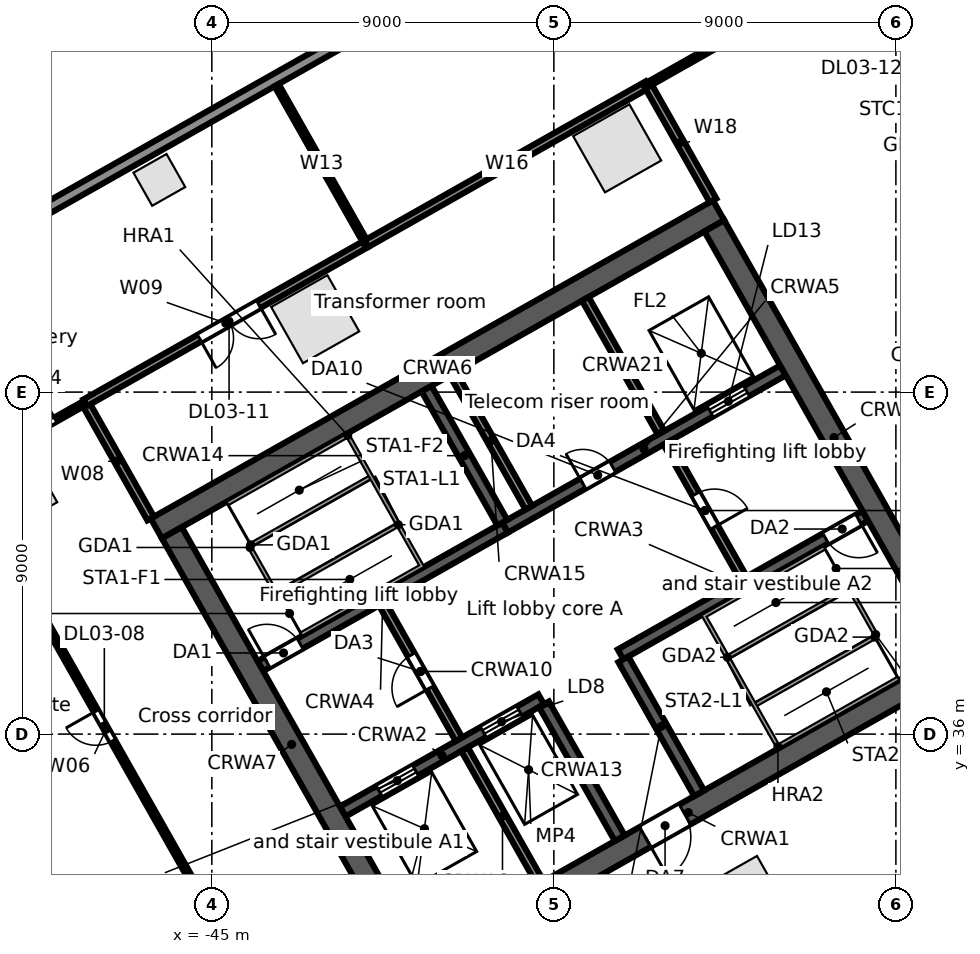
"""IFC4 building model, lengths in metres.
Left out: names, types, materials, properties, quantities, classifications, styles, units other than length and angle.
Written with IfcOpenShell. Run it as: python <this file> out.ifc"""

import sys

from ifc_helpers import new_model, si_unit, direction, frame, frame_2d, origin, origin_2d, place, context, subcontext, project, spatial, rectangle, extrude, element, fill, save


model = new_model("IFC4")
c1 = context("Model", 3, precision=1e-05, world=origin(), true_north=direction((0.0, 1.0)))
c2 = subcontext(c1, "Body", "Model", "MODEL_VIEW")
j1 = project(units=[si_unit("LENGTHUNIT", "METRE"), si_unit("PLANEANGLEUNIT", "RADIAN")], contexts=[c1])
p1 = place(None, origin())
s1 = spatial("IfcSite", under=j1, at=p1, CompositionType="ELEMENT")
p2 = place(p1, origin())
s2 = spatial("IfcBuilding", under=s1, at=p2, CompositionType="ELEMENT")
p3 = place(p2, frame((0.0, 0.0, 16.5)))
s3 = spatial("IfcBuildingStorey", under=s2, at=p3, CompositionType="ELEMENT", Elevation=16.5)
for number, where, z_axis, x_axis in (
    (1, (-34.334, 51.414, 0.0), (0.0, 0.0, 1.0), (-0.87, -0.492, 0.0)),
    (2, (-42.28, 46.919, 0.0), (0.0, 0.0, 1.0), (-0.87, -0.492, 0.0)),
    (3, (-50.226, 42.423, 0.0), (0.0, 0.0, 1.0), (-0.87, -0.492, 0.0)),
    (4, (-30.976, 31.635, 0.0), (0.0, 0.0, 1.0), (0.87, 0.492, 0.0)),
):
    element("IfcColumn", number, at=place(p3, frame(where, z_axis=z_axis, x_axis=x_axis)), inside=s3, PredefinedType="COLUMN", context=c2, shape_type="SweptSolid", body=[
        extrude(rectangle(XDim=1.7, YDim=1.7, at=origin_2d()), origin(), (0.0, 0.0, 1.0), 5.0),
    ])
p4 = place(p3, frame((-46.381, 50.584, 0.0), z_axis=(0.0, 0.0, 1.0), x_axis=(-0.87035569594, -0.492423560103, 0.0)))
e5 = element("IfcColumn", 5, at=p4, inside=s3, PredefinedType="COLUMN", context=c2, shape_type="SweptSolid", body=[
    extrude(rectangle(XDim=1.0, YDim=1.0, at=origin_2d()), origin(), (0.0, 0.0, 1.0), 5.0),
])
p5 = place(p3, frame((-63.707, 41.701, 0.0), z_axis=(0.0, 0.0, 1.0), x_axis=(0.870355510268, 0.492423888277, 0.0)))
e6 = element("IfcWall", 6, at=p5, inside=s3, PredefinedType="STANDARD", context=c2, shape_type="SweptSolid", body=[
    extrude(rectangle(XDim=67.903, YDim=0.3, at=frame_2d((33.952, 0.0))), origin(), (0.0, 0.0, 1.0), 4.65),
])
p6 = place(p3, frame((-45.526, 21.522, 0.0), z_axis=(0.0, 0.0, 1.0), x_axis=(-0.857164837164, 0.515042174903, 0.0)))
e7 = element("IfcWall", 7, at=p6, inside=s3, PredefinedType="STANDARD", context=c2, shape_type="SweptSolid", body=[
    extrude(rectangle(XDim=21.35, YDim=0.3, at=frame_2d((10.675, 0.0))), origin(), (0.0, 0.0, 1.0), 4.65),
])
p7 = place(p3, frame((-39.862, 29.749, 0.0), z_axis=(0.0, 0.0, 1.0), x_axis=(0.870350116061, 0.492433422375, 0.0)))
e8 = element("IfcWall", 8, at=p7, inside=s3, PredefinedType="SOLIDWALL", context=c2, shape_type="SweptSolid", body=[
    extrude(rectangle(XDim=17.0, YDim=0.6, at=frame_2d((8.5, 0.0))), origin(), (0.0, 0.0, 1.0), 4.65),
])
p8 = place(p7, frame((7.2, 0.0, 0.0)))
e9 = element("IfcOpeningElement", 9, at=p8, cuts=e8, PredefinedType="OPENING", context=c2, shape_type="SweptSolid", body=[
    extrude(rectangle(XDim=1.2, YDim=2.1, at=frame_2d((0.6, 1.05))), frame((0.0, 0.31, 0.0), z_axis=(0.0, -1.0, 0.0), x_axis=(1.0, 0.0, 0.0)), (0.0, 0.0, 1.0), 0.62),
])
p9 = place(p3, frame((-41.556, 33.961, 0.0), z_axis=(0.0, 0.0, 1.0), x_axis=(0.870343731308, 0.492444706919, 0.0)))
e10 = element("IfcWall", 10, at=p9, inside=s3, PredefinedType="SOLIDWALL", context=c2, shape_type="SweptSolid", body=[
    extrude(rectangle(XDim=6.0, YDim=0.3, at=frame_2d((3.0, 0.0))), origin(), (0.0, 0.0, 1.0), 4.65),
])
p10 = place(p9, frame((1.1, 0.0, 0.0)))
e11 = element("IfcOpeningElement", 11, at=p10, cuts=e10, PredefinedType="OPENING", context=c2, shape_type="SweptSolid", body=[
    extrude(rectangle(XDim=1.1, YDim=2.1, at=frame_2d((0.55, 1.05))), frame((0.0, 0.16, 0.0), z_axis=(0.0, -1.0, 0.0), x_axis=(1.0, 0.0, 0.0)), (0.0, 0.0, 1.0), 0.32),
])
p11 = place(p9, frame((4.25, 0.0, 0.0)))
e12 = element("IfcOpeningElement", 12, at=p11, cuts=e10, PredefinedType="OPENING", context=c2, shape_type="SweptSolid", body=[
    extrude(rectangle(XDim=1.1, YDim=2.1, at=frame_2d((0.55, 1.05))), frame((0.0, 0.16, 0.0), z_axis=(0.0, -1.0, 0.0), x_axis=(1.0, 0.0, 0.0)), (0.0, 0.0, 1.0), 0.32),
])
p12 = place(p3, frame((-34.245, 38.097, 0.0), z_axis=(0.0, 0.0, 1.0), x_axis=(0.870364910201, 0.492407273597, 0.0)))
e13 = element("IfcWall", 13, at=p12, inside=s3, PredefinedType="SOLIDWALL", context=c2, shape_type="SweptSolid", body=[
    extrude(rectangle(XDim=7.4, YDim=0.3, at=frame_2d((3.7, 0.0))), origin(), (0.0, 0.0, 1.0), 4.65),
])
p13 = place(p12, frame((6.2, 0.0, 0.0)))
e14 = element("IfcOpeningElement", 14, at=p13, cuts=e13, PredefinedType="OPENING", context=c2, shape_type="SweptSolid", body=[
    extrude(rectangle(XDim=1.0, YDim=2.1, at=frame_2d((0.5, 1.05))), frame((0.0, 0.16, 0.0), z_axis=(0.0, -1.0, 0.0), x_axis=(1.0, 0.0, 0.0)), (0.0, 0.0, 1.0), 0.32),
])
p14 = place(p3, frame((-43.723, 37.791, 0.0), z_axis=(0.0, 0.0, 1.0), x_axis=(0.87035077051, 0.49243226567, 0.0)))
e15 = element("IfcWall", 15, at=p14, inside=s3, PredefinedType="SOLIDWALL", context=c2, shape_type="SweptSolid", body=[
    extrude(rectangle(XDim=7.4, YDim=0.3, at=frame_2d((3.7, 0.0))), origin(), (0.0, 0.0, 1.0), 4.65),
])
p15 = place(p14, frame((0.2, 0.0, 0.0)))
e16 = element("IfcOpeningElement", 16, at=p15, cuts=e15, PredefinedType="OPENING", context=c2, shape_type="SweptSolid", body=[
    extrude(rectangle(XDim=1.0, YDim=2.1, at=frame_2d((0.5, 1.05))), frame((0.0, 0.16, 0.0), z_axis=(0.0, -1.0, 0.0), x_axis=(1.0, 0.0, 0.0)), (0.0, 0.0, 1.0), 0.32),
])
p16 = place(p3, frame((-37.282, 41.435, 0.0), z_axis=(0.0, 0.0, 1.0), x_axis=(0.870356516133, 0.492422110414, 0.0)))
e17 = element("IfcWall", 17, at=p16, inside=s3, PredefinedType="SOLIDWALL", context=c2, shape_type="SweptSolid", body=[
    extrude(rectangle(XDim=8.4, YDim=0.3, at=frame_2d((4.2, 0.0))), origin(), (0.0, 0.0, 1.0), 4.65),
])
p17 = place(p16, frame((6.2, 0.0, 0.0)))
e18 = element("IfcOpeningElement", 18, at=p17, cuts=e17, PredefinedType="OPENING", context=c2, shape_type="SweptSolid", body=[
    extrude(rectangle(XDim=1.1, YDim=2.1, at=frame_2d((0.55, 1.05))), frame((0.0, 0.16, 0.0), z_axis=(0.0, -1.0, 0.0), x_axis=(1.0, 0.0, 0.0)), (0.0, 0.0, 1.0), 0.32),
])
p18 = place(p16, frame((2.35, 0.0, 0.0)))
e19 = element("IfcOpeningElement", 19, at=p18, cuts=e17, PredefinedType="OPENING", context=c2, shape_type="SweptSolid", body=[
    extrude(rectangle(XDim=0.9, YDim=2.1, at=frame_2d((0.45, 1.05))), frame((0.0, 0.16, 0.0), z_axis=(0.0, -1.0, 0.0), x_axis=(1.0, 0.0, 0.0)), (0.0, 0.0, 1.0), 0.32),
])
p19 = place(p3, frame((-46.461, 41.412, 0.0), z_axis=(0.0, 0.0, 1.0), x_axis=(0.870350116061, 0.492433422375, 0.0)))
e20 = element("IfcWall", 20, at=p19, inside=s3, PredefinedType="SOLIDWALL", context=c2, shape_type="SweptSolid", body=[
    extrude(rectangle(XDim=17.0, YDim=0.6, at=frame_2d((8.5, 0.0))), origin(), (0.0, 0.0, 1.0), 4.65),
])
p20 = place(p3, frame((-46.052, 41.298, 0.0), z_axis=(0.0, 0.0, 1.0), x_axis=(0.492418598281, -0.870358503186, 0.0)))
e21 = element("IfcWall", 21, at=p20, inside=s3, PredefinedType="SOLIDWALL", context=c2, shape_type="SweptSolid", body=[
    extrude(rectangle(XDim=12.8, YDim=0.6, at=frame_2d((6.4, 0.0))), origin(), (0.0, 0.0, 1.0), 4.65),
])
p21 = place(p3, frame((-38.349, 35.603, 0.0), z_axis=(0.0, 0.0, 1.0), x_axis=(0.49241474071, -0.870360685654, 0.0)))
e22 = element("IfcWall", 22, at=p21, inside=s3, PredefinedType="SOLIDWALL", context=c2, shape_type="SweptSolid", body=[
    extrude(rectangle(XDim=4.05, YDim=0.2, at=frame_2d((2.025, 0.0))), origin(), (0.0, 0.0, 1.0), 4.65),
])
p22 = place(p3, frame((-40.516, 39.433, 0.0), z_axis=(0.0, 0.0, 1.0), x_axis=(0.492453559952, -0.87033872216, 0.0)))
e23 = element("IfcWall", 23, at=p22, inside=s3, PredefinedType="PARTITIONING", context=c2, shape_type="SweptSolid", body=[
    extrude(rectangle(XDim=4.1, YDim=0.2, at=frame_2d((2.05, 0.0))), origin(), (0.0, 0.0, 1.0), 4.65),
])
p23 = place(p22, frame((1.55, 0.0, 0.0)))
e24 = element("IfcOpeningElement", 24, at=p23, cuts=e23, PredefinedType="OPENING", context=c2, shape_type="SweptSolid", body=[
    extrude(rectangle(XDim=1.0, YDim=2.1, at=frame_2d((0.5, 1.05))), frame((0.0, 0.11, 0.0), z_axis=(0.0, -1.0, 0.0), x_axis=(1.0, 0.0, 0.0)), (0.0, 0.0, 1.0), 0.22),
])
p24 = place(p3, frame((-36.26, 36.785, 0.0), z_axis=(0.0, 0.0, 1.0), x_axis=(0.492440575896, -0.870346068648, 0.0)))
e25 = element("IfcWall", 25, at=p24, inside=s3, PredefinedType="SOLIDWALL", context=c2, shape_type="SweptSolid", body=[
    extrude(rectangle(XDim=4.05, YDim=0.3, at=frame_2d((2.025, 0.0))), origin(), (0.0, 0.0, 1.0), 4.65),
])
p25 = place(p3, frame((-39.35, 45.09, 0.0), z_axis=(0.0, 0.0, 1.0), x_axis=(0.49241474071, -0.870360685654, 0.0)))
e26 = element("IfcWall", 26, at=p25, inside=s3, PredefinedType="SOLIDWALL", context=c2, shape_type="SweptSolid", body=[
    extrude(rectangle(XDim=4.05, YDim=0.3, at=frame_2d((2.025, 0.0))), origin(), (0.0, 0.0, 1.0), 4.65),
])
p26 = place(p3, frame((-38.654, 45.484, 0.0), z_axis=(0.0, 0.0, 1.0), x_axis=(0.492440575896, -0.870346068648, 0.0)))
e27 = element("IfcWall", 27, at=p26, inside=s3, PredefinedType="SOLIDWALL", context=c2, shape_type="SweptSolid", body=[
    extrude(rectangle(XDim=4.05, YDim=0.2, at=frame_2d((2.025, 0.0))), origin(), (0.0, 0.0, 1.0), 4.65),
])
p27 = place(p3, frame((-34.171, 37.967, 0.0), z_axis=(0.0, 0.0, 1.0), x_axis=(0.492394910396, -0.870371904542, 0.0)))
e28 = element("IfcWall", 28, at=p27, inside=s3, PredefinedType="SOLIDWALL", context=c2, shape_type="SweptSolid", body=[
    extrude(rectangle(XDim=4.05, YDim=0.3, at=frame_2d((2.025, 0.0))), origin(), (0.0, 0.0, 1.0), 4.65),
])
p28 = place(p3, frame((-33.031, 43.667, 0.0), z_axis=(0.0, 0.0, 1.0), x_axis=(0.492408451753, -0.87036424366, 0.0)))
e29 = element("IfcWall", 29, at=p28, inside=s3, PredefinedType="PARTITIONING", context=c2, shape_type="SweptSolid", body=[
    extrude(rectangle(XDim=4.1, YDim=0.2, at=frame_2d((2.05, 0.0))), origin(), (0.0, 0.0, 1.0), 4.65),
])
p29 = place(p28, frame((1.55, 0.0, 0.0)))
e30 = element("IfcOpeningElement", 30, at=p29, cuts=e29, PredefinedType="OPENING", context=c2, shape_type="SweptSolid", body=[
    extrude(rectangle(XDim=1.0, YDim=2.1, at=frame_2d((0.5, 1.05))), frame((0.0, 0.11, 0.0), z_axis=(0.0, -1.0, 0.0), x_axis=(1.0, 0.0, 0.0)), (0.0, 0.0, 1.0), 0.22),
])
p30 = place(p3, frame((-35.173, 47.454, 0.0), z_axis=(0.0, 0.0, 1.0), x_axis=(0.492440575896, -0.870346068648, 0.0)))
e31 = element("IfcWall", 31, at=p30, inside=s3, PredefinedType="SOLIDWALL", context=c2, shape_type="SweptSolid", body=[
    extrude(rectangle(XDim=4.05, YDim=0.2, at=frame_2d((2.025, 0.0))), origin(), (0.0, 0.0, 1.0), 4.65),
])
p31 = place(p3, frame((-31.778, 49.374, 0.0), z_axis=(0.0, 0.0, 1.0), x_axis=(0.492433046652, -0.870350328641, 0.0)))
e32 = element("IfcWall", 32, at=p31, inside=s3, PredefinedType="SOLIDWALL", context=c2, shape_type="SweptSolid", body=[
    extrude(rectangle(XDim=12.8, YDim=0.6, at=frame_2d((6.4, 0.0))), origin(), (0.0, 0.0, 1.0), 4.65),
])
p32 = place(p3, frame((-51.596, 42.873, 0.0), z_axis=(0.0, 0.0, 1.0), x_axis=(0.87043427122, 0.492284652905, 0.0)))
e33 = element("IfcWall", 33, at=p32, inside=s3, PredefinedType="PARTITIONING", context=c2, shape_type="SweptSolid", body=[
    extrude(rectangle(XDim=3.75, YDim=0.125, at=frame_2d((1.875, 0.0))), origin(), (0.0, 0.0, 1.0), 4.65),
])
p33 = place(p32, frame((1.95, 0.0, 0.0)))
e34 = element("IfcOpeningElement", 34, at=p33, cuts=e33, PredefinedType="OPENING", context=c2, shape_type="SweptSolid", body=[
    extrude(rectangle(XDim=0.9, YDim=2.1, at=frame_2d((0.45, 1.05))), frame((0.0, 0.073, 0.0), z_axis=(0.0, -1.0, 0.0), x_axis=(1.0, 0.0, 0.0)), (0.0, 0.0, 1.0), 0.145),
])
p34 = place(p3, frame((-51.596, 42.873, 0.0), z_axis=(0.0, 0.0, 1.0), x_axis=(0.492435038471, -0.870349201692, 0.0)))
e35 = element("IfcWall", 35, at=p34, inside=s3, PredefinedType="PARTITIONING", context=c2, shape_type="SweptSolid", body=[
    extrude(rectangle(XDim=15.501, YDim=0.125, at=frame_2d((7.75, 0.0))), origin(), (0.0, 0.0, 1.0), 3.712),
])
p35 = place(p34, frame((7.2, 0.0, 0.0)))
e36 = element("IfcOpeningElement", 36, at=p35, cuts=e35, PredefinedType="OPENING", context=c2, shape_type="SweptSolid", body=[
    extrude(rectangle(XDim=0.9, YDim=2.1, at=frame_2d((0.45, 1.05))), frame((0.0, 0.073, 0.0), z_axis=(0.0, -1.0, 0.0), x_axis=(1.0, 0.0, 0.0)), (0.0, 0.0, 1.0), 0.145),
])
p36 = place(p3, frame((-48.332, 44.719, 0.0), z_axis=(0.0, 0.0, 1.0), x_axis=(0.492392845909, -0.87037307248, 0.0)))
e37 = element("IfcWall", 37, at=p36, inside=s3, PredefinedType="PARTITIONING", context=c2, shape_type="SweptSolid", body=[
    extrude(rectangle(XDim=3.5, YDim=0.2, at=frame_2d((1.75, 0.0))), origin(), (0.0, 0.0, 1.0), 3.93),
])
p37 = place(p3, frame((-48.332, 44.719, 0.0), z_axis=(0.0, 0.0, 1.0), x_axis=(0.870331650579, 0.492466057713, 0.0)))
e38 = element("IfcWall", 38, at=p37, inside=s3, PredefinedType="PARTITIONING", context=c2, shape_type="SweptSolid", body=[
    extrude(rectangle(XDim=8.5, YDim=0.2, at=frame_2d((4.25, 0.0))), origin(), (0.0, 0.0, 1.0), 4.03),
])
p38 = place(p37, frame((3.45, 0.0, 0.0)))
e39 = element("IfcOpeningElement", 39, at=p38, cuts=e38, PredefinedType="OPENING", context=c2, shape_type="SweptSolid", body=[
    extrude(rectangle(XDim=1.8, YDim=2.1, at=frame_2d((0.9, 1.05))), frame((0.0, 0.11, 0.0), z_axis=(0.0, -1.0, 0.0), x_axis=(1.0, 0.0, 0.0)), (0.0, 0.0, 1.0), 0.22),
])
p39 = place(p3, frame((-43.295, 53.077, 0.0), z_axis=(0.0, 0.0, 1.0), x_axis=(0.492503605136, -0.87031040378, 0.0)))
e40 = element("IfcWall", 40, at=p39, inside=s3, PredefinedType="PARTITIONING", context=c2, shape_type="SweptSolid", body=[
    extrude(rectangle(XDim=4.793, YDim=0.125, at=frame_2d((2.397, 0.0))), origin(), (0.0, 0.0, 1.0), 3.93),
])
p40 = place(p3, frame((-40.934, 48.905, 0.0), z_axis=(0.0, 0.0, 1.0), x_axis=(0.870387854278, 0.492366716102, 0.0)))
e41 = element("IfcWall", 41, at=p40, inside=s3, PredefinedType="PARTITIONING", context=c2, shape_type="SweptSolid", body=[
    extrude(rectangle(XDim=8.5, YDim=0.2, at=frame_2d((4.25, 0.0))), origin(), (0.0, 0.0, 1.0), 4.03),
])
p41 = place(p3, frame((-33.536, 53.09, 0.0), z_axis=(0.0, 0.0, 1.0), x_axis=(0.492521469645, -0.870300294116, 0.0)))
e42 = element("IfcWall", 42, at=p41, inside=s3, PredefinedType="PARTITIONING", context=c2, shape_type="SweptSolid", body=[
    extrude(rectangle(XDim=3.5, YDim=0.2, at=frame_2d((1.75, 0.0))), origin(), (0.0, 0.0, 1.0), 3.93),
])
p42 = place(p3, frame((-33.536, 53.09, 0.0), z_axis=(0.0, 0.0, 1.0), x_axis=(0.870327439455, 0.492473499928, 0.0)))
e43 = element("IfcWall", 43, at=p42, inside=s3, PredefinedType="PARTITIONING", context=c2, shape_type="SweptSolid", body=[
    extrude(rectangle(XDim=8.0, YDim=0.125, at=frame_2d((4.0, 0.0))), origin(), (0.0, 0.0, 1.0), 3.712),
])
p43 = place(p42, frame((3.45, 0.0, 0.0)))
e44 = element("IfcOpeningElement", 44, at=p43, cuts=e43, PredefinedType="OPENING", context=c2, shape_type="SweptSolid", body=[
    extrude(rectangle(XDim=0.9, YDim=2.1, at=frame_2d((0.45, 1.05))), frame((0.0, 0.073, 0.0), z_axis=(0.0, -1.0, 0.0), x_axis=(1.0, 0.0, 0.0)), (0.0, 0.0, 1.0), 0.145),
])
p44 = place(p17, origin())
e45 = element("IfcDoor", 45, at=p44, inside=s3, OperationType="DOUBLE_DOOR_SLIDING", PredefinedType="DOOR", context=c2, shape_type="SweptSolid", body=[
    extrude(rectangle(XDim=1.1, YDim=2.1, at=frame_2d((0.55, 1.05))), frame((0.0, 0.025, 0.0), z_axis=(0.0, -1.0, 0.0), x_axis=(1.0, 0.0, 0.0)), (0.0, 0.0, 1.0), 0.05),
])
fill(e18, e45)
p45 = place(p10, origin())
e46 = element("IfcDoor", 46, at=p45, inside=s3, OperationType="DOUBLE_DOOR_SLIDING", PredefinedType="DOOR", context=c2, shape_type="SweptSolid", body=[
    extrude(rectangle(XDim=1.1, YDim=2.1, at=frame_2d((0.55, 1.05))), frame((0.0, 0.025, 0.0), z_axis=(0.0, -1.0, 0.0), x_axis=(1.0, 0.0, 0.0)), (0.0, 0.0, 1.0), 0.05),
])
fill(e11, e46)
p46 = place(p11, origin())
e47 = element("IfcDoor", 47, at=p46, inside=s3, OperationType="DOUBLE_DOOR_SLIDING", PredefinedType="DOOR", context=c2, shape_type="SweptSolid", body=[
    extrude(rectangle(XDim=1.1, YDim=2.1, at=frame_2d((0.55, 1.05))), frame((0.0, 0.025, 0.0), z_axis=(0.0, -1.0, 0.0), x_axis=(1.0, 0.0, 0.0)), (0.0, 0.0, 1.0), 0.05),
])
fill(e12, e47)
p47 = place(p15, origin())
e48 = element("IfcDoor", 48, at=p47, inside=s3, OperationType="SINGLE_SWING_LEFT", PredefinedType="DOOR", context=c2, shape_type="SweptSolid", body=[
    extrude(rectangle(XDim=1.0, YDim=2.1, at=frame_2d((0.5, 1.05))), frame((0.0, 0.025, 0.0), z_axis=(0.0, -1.0, 0.0), x_axis=(1.0, 0.0, 0.0)), (0.0, 0.0, 1.0), 0.05),
])
fill(e16, e48)
p48 = place(p13, frame((1.0, 0.0, 0.0), z_axis=(0.0, 0.0, 1.0), x_axis=(-1.0, 0.0, 0.0)))
e49 = element("IfcDoor", 49, at=p48, inside=s3, OperationType="SINGLE_SWING_LEFT", PredefinedType="DOOR", context=c2, shape_type="SweptSolid", body=[
    extrude(rectangle(XDim=1.0, YDim=2.1, at=frame_2d((0.5, 1.05))), frame((0.0, 0.025, 0.0), z_axis=(0.0, -1.0, 0.0), x_axis=(1.0, 0.0, 0.0)), (0.0, 0.0, 1.0), 0.05),
])
fill(e14, e49)
p49 = place(p23, frame((1.0, 0.0, 0.0), z_axis=(0.0, 0.0, 1.0), x_axis=(-1.0, 0.0, 0.0)))
e50 = element("IfcDoor", 50, at=p49, inside=s3, OperationType="SINGLE_SWING_LEFT", PredefinedType="DOOR", context=c2, shape_type="SweptSolid", body=[
    extrude(rectangle(XDim=1.0, YDim=2.1, at=frame_2d((0.5, 1.05))), frame((0.0, 0.025, 0.0), z_axis=(0.0, -1.0, 0.0), x_axis=(1.0, 0.0, 0.0)), (0.0, 0.0, 1.0), 0.05),
])
fill(e24, e50)
p50 = place(p29, origin())
e51 = element("IfcDoor", 51, at=p50, inside=s3, OperationType="SINGLE_SWING_RIGHT", PredefinedType="DOOR", context=c2, shape_type="SweptSolid", body=[
    extrude(rectangle(XDim=1.0, YDim=2.1, at=frame_2d((0.5, 1.05))), frame((0.0, 0.025, 0.0), z_axis=(0.0, -1.0, 0.0), x_axis=(1.0, 0.0, 0.0)), (0.0, 0.0, 1.0), 0.05),
])
fill(e30, e51)
p51 = place(p8, frame((1.2, 0.0, 0.0), z_axis=(0.0, 0.0, 1.0), x_axis=(-1.0, 0.0, 0.0)))
e52 = element("IfcDoor", 52, at=p51, inside=s3, OperationType="SINGLE_SWING_RIGHT", PredefinedType="DOOR", context=c2, shape_type="SweptSolid", body=[
    extrude(rectangle(XDim=1.2, YDim=2.1, at=frame_2d((0.6, 1.05))), frame((0.0, 0.025, 0.0), z_axis=(0.0, -1.0, 0.0), x_axis=(1.0, 0.0, 0.0)), (0.0, 0.0, 1.0), 0.05),
])
fill(e9, e52)
p52 = place(p18, origin())
e53 = element("IfcDoor", 53, at=p52, inside=s3, OperationType="SINGLE_SWING_LEFT", PredefinedType="DOOR", context=c2, shape_type="SweptSolid", body=[
    extrude(rectangle(XDim=0.9, YDim=2.1, at=frame_2d((0.45, 1.05))), frame((0.0, 0.025, 0.0), z_axis=(0.0, -1.0, 0.0), x_axis=(1.0, 0.0, 0.0)), (0.0, 0.0, 1.0), 0.05),
])
fill(e19, e53)
p53 = place(p33, origin())
e54 = element("IfcDoor", 54, at=p53, inside=s3, OperationType="SINGLE_SWING_RIGHT", PredefinedType="DOOR", context=c2, shape_type="SweptSolid", body=[
    extrude(rectangle(XDim=0.9, YDim=2.1, at=frame_2d((0.45, 1.05))), frame((0.0, 0.025, 0.0), z_axis=(0.0, -1.0, 0.0), x_axis=(1.0, 0.0, 0.0)), (0.0, 0.0, 1.0), 0.05),
])
fill(e34, e54)
p54 = place(p35, frame((0.9, 0.0, 0.0), z_axis=(0.0, 0.0, 1.0), x_axis=(-1.0, 0.0, 0.0)))
e55 = element("IfcDoor", 55, at=p54, inside=s3, OperationType="SINGLE_SWING_RIGHT", PredefinedType="DOOR", context=c2, shape_type="SweptSolid", body=[
    extrude(rectangle(XDim=0.9, YDim=2.1, at=frame_2d((0.45, 1.05))), frame((0.0, 0.025, 0.0), z_axis=(0.0, -1.0, 0.0), x_axis=(1.0, 0.0, 0.0)), (0.0, 0.0, 1.0), 0.05),
])
fill(e36, e55)
p55 = place(p38, frame((1.8, 0.0, 0.0), z_axis=(0.0, 0.0, 1.0), x_axis=(-1.0, 0.0, 0.0)))
e56 = element("IfcDoor", 56, at=p55, inside=s3, OperationType="DOUBLE_DOOR_SINGLE_SWING", PredefinedType="DOOR", context=c2, shape_type="SweptSolid", body=[
    extrude(rectangle(XDim=1.8, YDim=2.1, at=frame_2d((0.9, 1.05))), frame((0.0, 0.025, 0.0), z_axis=(0.0, -1.0, 0.0), x_axis=(1.0, 0.0, 0.0)), (0.0, 0.0, 1.0), 0.05),
])
fill(e39, e56)
save(model, sys.argv[1])
